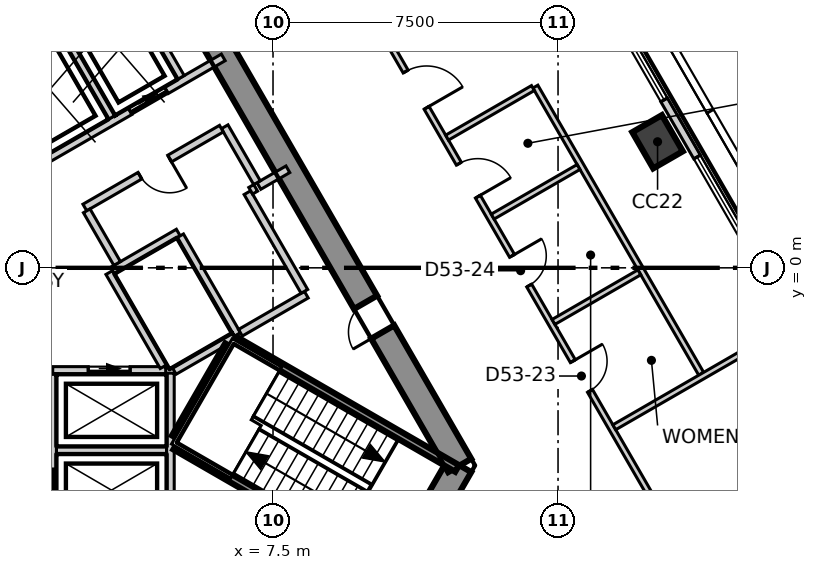
"""IFC4 building model, lengths in metres.
Left out: names, types, materials, properties, quantities, classifications, styles, units other than length and angle.
Written with IfcOpenShell. Run it as: python <this file> out.ifc"""

import sys

from ifc_helpers import new_model, si_unit, direction, frame, frame_2d, origin, origin_2d, place, context, subcontext, project, spatial, polyline, rectangle, outline, extrude, element, fill, save


model = new_model("IFC4")
c1 = context("Model", 3, precision=1e-05, world=origin(), true_north=direction((0.0, 1.0)))
c2 = subcontext(c1, "Body", "Model", "MODEL_VIEW")
j1 = project(units=[si_unit("LENGTHUNIT", "METRE"), si_unit("PLANEANGLEUNIT", "RADIAN")], contexts=[c1])
p1 = place(None, origin())
s1 = spatial("IfcSite", under=j1, at=p1, CompositionType="ELEMENT")
p2 = place(p1, origin())
s2 = spatial("IfcBuilding", under=s1, at=p2, CompositionType="ELEMENT")
p3 = place(p2, frame((0.0, 0.0, 227.3)))
s3 = spatial("IfcBuildingStorey", under=s2, at=p3, CompositionType="ELEMENT", Elevation=227.3)
p4 = place(p3, frame((10.71, -8.15, -0.3), z_axis=(0.0, 0.0, 1.0), x_axis=(0.49999337185, 0.866029230515, 0.0)))
e1 = element("IfcWall", 1, at=p4, inside=s3, PredefinedType="SHEAR", context=c2, shape_type="SweptSolid", body=[
    extrude(outline(polyline([(-0.202, -0.35), (1.703, -0.35), (3.608, -0.35), (3.204, 0.35), (1.703, 0.35), (0.202, 0.35), (-0.202, -0.35)])), origin(), (0.0, 0.0, 1.0), 4.0),
])
p5 = place(p4, frame((1.003, 0.0, 0.3)))
e2 = element("IfcOpeningElement", 2, at=p5, cuts=e1, PredefinedType="OPENING", context=c2, shape_type="SweptSolid", body=[
    extrude(rectangle(XDim=1.4, YDim=2.1, at=frame_2d((0.7, 1.05))), frame((0.0, 0.36, 0.0), z_axis=(0.0, -1.0, 0.0), x_axis=(1.0, 0.0, 0.0)), (0.0, 0.0, 1.0), 0.72),
])
p6 = place(p3, frame((12.413, -5.2, -0.3), z_axis=(0.0, 0.0, 1.0), x_axis=(-0.500011533395, 0.866018744874, 0.0)))
e3 = element("IfcWall", 3, at=p6, inside=s3, PredefinedType="SHEAR", context=c2, shape_type="SweptSolid", body=[
    extrude(outline(polyline([(-0.202, -0.35), (1.782, -0.35), (3.766, -0.35), (5.75, -0.35), (7.734, -0.35), (9.718, -0.35), (11.702, -0.35), (13.686, -0.35), (15.67, -0.35), (17.654, -0.35), (19.638, -0.35), (21.622, -0.35), (21.218, 0.35), (19.307, 0.35), (17.397, 0.35), (15.486, 0.35), (13.576, 0.35), (11.665, 0.35), (9.755, 0.35), (7.844, 0.35), (5.934, 0.35), (4.023, 0.35), (2.113, 0.35), (0.202, 0.35), (-0.202, -0.35)])), origin(), (0.0, 0.0, 1.0), 4.0),
])
p7 = place(p6, frame((4.055, 0.0, 0.3)))
e4 = element("IfcOpeningElement", 4, at=p7, cuts=e3, PredefinedType="OPENING", context=c2, shape_type="SweptSolid", body=[
    extrude(rectangle(XDim=0.9, YDim=2.1, at=frame_2d((0.45, 1.05))), frame((0.0, 0.36, 0.0), z_axis=(0.0, -1.0, 0.0), x_axis=(1.0, 0.0, 0.0)), (0.0, 0.0, 1.0), 0.72),
])
p8 = place(p6, frame((16.415, 0.0, 0.3)))
e5 = element("IfcOpeningElement", 5, at=p8, cuts=e3, PredefinedType="OPENING", context=c2, shape_type="SweptSolid", body=[
    extrude(rectangle(XDim=1.0, YDim=2.1, at=frame_2d((0.5, 1.05))), frame((0.0, 0.36, 0.0), z_axis=(0.0, -1.0, 0.0), x_axis=(1.0, 0.0, 0.0)), (0.0, 0.0, 1.0), 0.72),
])
p9 = place(p3, frame((17.619, 3.317, -0.3), z_axis=(0.0, 0.0, 1.0), x_axis=(-0.5, 0.866025403784, 0.0)))
e6 = element("IfcColumn", 6, at=p9, inside=s3, PredefinedType="COLUMN", context=c2, shape_type="SweptSolid", body=[
    extrude(rectangle(XDim=1.1, YDim=0.9, at=origin_2d()), origin(), (0.0, 0.0, 1.0), 4.0),
])
p10 = place(p3, frame((27.782, -12.884, 0.0), z_axis=(0.0, 0.0, 1.0), x_axis=(-0.500023345841, 0.866011924637, 0.0)))
e7 = element("IfcWall", 7, at=p10, inside=s3, PredefinedType="ELEMENTEDWALL", context=c2, shape_type="SweptSolid", body=[
    extrude(rectangle(XDim=50.078, YDim=0.2, at=frame_2d((25.039, 0.0))), origin(), (0.0, 0.0, 1.0), 3.7),
])
p11 = place(p10, frame((2.171, 0.0, 0.9)))
e8 = element("IfcOpeningElement", 8, at=p11, cuts=e7, PredefinedType="OPENING", context=c2, shape_type="SweptSolid", body=[
    extrude(rectangle(XDim=4.2, YDim=2.5, at=frame_2d((2.1, 1.25))), frame((0.0, 0.11, 0.0), z_axis=(0.0, -1.0, 0.0), x_axis=(1.0, 0.0, 0.0)), (0.0, 0.0, 1.0), 0.22),
])
p12 = place(p10, frame((8.108, 0.0, 0.9)))
e9 = element("IfcOpeningElement", 9, at=p12, cuts=e7, PredefinedType="OPENING", context=c2, shape_type="SweptSolid", body=[
    extrude(rectangle(XDim=4.2, YDim=2.5, at=frame_2d((2.1, 1.25))), frame((0.0, 0.11, 0.0), z_axis=(0.0, -1.0, 0.0), x_axis=(1.0, 0.0, 0.0)), (0.0, 0.0, 1.0), 0.22),
])
p13 = place(p10, frame((14.044, 0.0, 0.9)))
e10 = element("IfcOpeningElement", 10, at=p13, cuts=e7, PredefinedType="OPENING", context=c2, shape_type="SweptSolid", body=[
    extrude(rectangle(XDim=4.2, YDim=2.5, at=frame_2d((2.1, 1.25))), frame((0.0, 0.11, 0.0), z_axis=(0.0, -1.0, 0.0), x_axis=(1.0, 0.0, 0.0)), (0.0, 0.0, 1.0), 0.22),
])
p14 = place(p10, frame((19.981, 0.0, 0.9)))
e11 = element("IfcOpeningElement", 11, at=p14, cuts=e7, PredefinedType="OPENING", context=c2, shape_type="SweptSolid", body=[
    extrude(rectangle(XDim=4.2, YDim=2.5, at=frame_2d((2.1, 1.25))), frame((0.0, 0.11, 0.0), z_axis=(0.0, -1.0, 0.0), x_axis=(1.0, 0.0, 0.0)), (0.0, 0.0, 1.0), 0.22),
])
p15 = place(p10, frame((25.917, 0.0, 0.9)))
e12 = element("IfcOpeningElement", 12, at=p15, cuts=e7, PredefinedType="OPENING", context=c2, shape_type="SweptSolid", body=[
    extrude(rectangle(XDim=4.2, YDim=2.5, at=frame_2d((2.1, 1.25))), frame((0.0, 0.11, 0.0), z_axis=(0.0, -1.0, 0.0), x_axis=(1.0, 0.0, 0.0)), (0.0, 0.0, 1.0), 0.22),
])
p16 = place(p10, frame((31.854, 0.0, 0.9)))
e13 = element("IfcOpeningElement", 13, at=p16, cuts=e7, PredefinedType="OPENING", context=c2, shape_type="SweptSolid", body=[
    extrude(rectangle(XDim=4.2, YDim=2.5, at=frame_2d((2.1, 1.25))), frame((0.0, 0.11, 0.0), z_axis=(0.0, -1.0, 0.0), x_axis=(1.0, 0.0, 0.0)), (0.0, 0.0, 1.0), 0.22),
])
p17 = place(p10, frame((37.79, 0.0, 0.9)))
e14 = element("IfcOpeningElement", 14, at=p17, cuts=e7, PredefinedType="OPENING", context=c2, shape_type="SweptSolid", body=[
    extrude(rectangle(XDim=4.2, YDim=2.5, at=frame_2d((2.1, 1.25))), frame((0.0, 0.11, 0.0), z_axis=(0.0, -1.0, 0.0), x_axis=(1.0, 0.0, 0.0)), (0.0, 0.0, 1.0), 0.22),
])
p18 = place(p10, frame((43.727, 0.0, 0.9)))
e15 = element("IfcOpeningElement", 15, at=p18, cuts=e7, PredefinedType="OPENING", context=c2, shape_type="SweptSolid", body=[
    extrude(rectangle(XDim=4.2, YDim=2.5, at=frame_2d((2.1, 1.25))), frame((0.0, 0.11, 0.0), z_axis=(0.0, -1.0, 0.0), x_axis=(1.0, 0.0, 0.0)), (0.0, 0.0, 1.0), 0.22),
])
p19 = place(p3, frame((0.075, 24.07, 0.0), z_axis=(0.0, 0.0, 1.0), x_axis=(0.49999939571, -0.866025752671, 0.0)))
e16 = element("IfcWall", 16, at=p19, inside=s3, PredefinedType="PARTITIONING", context=c2, shape_type="SweptSolid", body=[
    extrude(rectangle(XDim=41.614, YDim=0.15, at=frame_2d((20.807, 0.0))), origin(), (0.0, 0.0, 1.0), 3.7),
])
p20 = place(p19, frame((36.714, 0.0, 0.0)))
e17 = element("IfcOpeningElement", 17, at=p20, cuts=e16, PredefinedType="OPENING", context=c2, shape_type="SweptSolid", body=[
    extrude(rectangle(XDim=1.1, YDim=2.1, at=frame_2d((0.55, 1.05))), frame((0.0, 0.085, 0.0), z_axis=(0.0, -1.0, 0.0), x_axis=(1.0, 0.0, 0.0)), (0.0, 0.0, 1.0), 0.17),
])
p21 = place(p19, frame((21.831, 0.0, 0.0)))
e18 = element("IfcOpeningElement", 18, at=p21, cuts=e16, PredefinedType="OPENING", context=c2, shape_type="SweptSolid", body=[
    extrude(rectangle(XDim=1.1, YDim=2.1, at=frame_2d((0.55, 1.05))), frame((0.0, 0.085, 0.0), z_axis=(0.0, -1.0, 0.0), x_axis=(1.0, 0.0, 0.0)), (0.0, 0.0, 1.0), 0.17),
])
p22 = place(p19, frame((30.631, 0.0, 0.0)))
e19 = element("IfcOpeningElement", 19, at=p22, cuts=e16, PredefinedType="OPENING", context=c2, shape_type="SweptSolid", body=[
    extrude(rectangle(XDim=0.9, YDim=2.1, at=frame_2d((0.45, 1.05))), frame((0.0, 0.085, 0.0), z_axis=(0.0, -1.0, 0.0), x_axis=(1.0, 0.0, 0.0)), (0.0, 0.0, 1.0), 0.17),
])
p23 = place(p19, frame((27.431, 0.0, 0.0)))
e20 = element("IfcOpeningElement", 20, at=p23, cuts=e16, PredefinedType="OPENING", context=c2, shape_type="SweptSolid", body=[
    extrude(rectangle(XDim=0.9, YDim=2.1, at=frame_2d((0.45, 1.05))), frame((0.0, 0.085, 0.0), z_axis=(0.0, -1.0, 0.0), x_axis=(1.0, 0.0, 0.0)), (0.0, 0.0, 1.0), 0.17),
])
p24 = place(p19, frame((24.631, 0.0, 0.0)))
e21 = element("IfcOpeningElement", 21, at=p24, cuts=e16, PredefinedType="OPENING", context=c2, shape_type="SweptSolid", body=[
    extrude(rectangle(XDim=1.0, YDim=2.1, at=frame_2d((0.5, 1.05))), frame((0.0, 0.085, 0.0), z_axis=(0.0, -1.0, 0.0), x_axis=(1.0, 0.0, 0.0)), (0.0, 0.0, 1.0), 0.17),
])
p25 = place(p19, frame((14.358, 0.0, 0.0)))
e22 = element("IfcOpeningElement", 22, at=p25, cuts=e16, PredefinedType="OPENING", context=c2, shape_type="SweptSolid", body=[
    extrude(rectangle(XDim=1.1, YDim=2.1, at=frame_2d((0.55, 1.05))), frame((0.0, 0.085, 0.0), z_axis=(0.0, -1.0, 0.0), x_axis=(1.0, 0.0, 0.0)), (0.0, 0.0, 1.0), 0.17),
])
p26 = place(p19, frame((3.885, 0.0, 0.0)))
e23 = element("IfcOpeningElement", 23, at=p26, cuts=e16, PredefinedType="OPENING", context=c2, shape_type="SweptSolid", body=[
    extrude(rectangle(XDim=1.1, YDim=2.1, at=frame_2d((0.55, 1.05))), frame((0.0, 0.085, 0.0), z_axis=(0.0, -1.0, 0.0), x_axis=(1.0, 0.0, 0.0)), (0.0, 0.0, 1.0), 0.17),
])
p27 = place(p3, frame((14.404, 4.768, 0.0), z_axis=(0.0, 0.0, 1.0), x_axis=(0.500042162787, -0.86600105972, 0.0)))
e24 = element("IfcWall", 24, at=p27, inside=s3, PredefinedType="PARTITIONING", context=c2, shape_type="SweptSolid", body=[
    extrude(rectangle(XDim=8.725, YDim=0.15, at=frame_2d((4.363, 0.0))), origin(), (0.0, 0.0, 1.0), 3.7),
])
for number, where, z_axis, x_axis in (
    (25, (12.08, 3.426, 0.0), (0.0, 0.0, 1.0), (0.866, 0.5, 0.0)),
    (26, (13.28, 1.348, 0.0), (0.0, 0.0, 1.0), (0.866, 0.5, 0.0)),
):
    element("IfcWall", number, at=place(p3, frame(where, z_axis=z_axis, x_axis=x_axis)), inside=s3, PredefinedType="PARTITIONING", context=c2, shape_type="SweptSolid", body=[
        extrude(rectangle(XDim=2.608, YDim=0.15, at=frame_2d((1.304, 0.0))), origin(), (0.0, 0.0, 1.0), 3.7),
    ])
p28 = place(p3, frame((14.88, -1.424, 0.0), z_axis=(0.0, 0.0, 1.0), x_axis=(0.865872279416, 0.500265125447, 0.0)))
e27 = element("IfcWall", 27, at=p28, inside=s3, PredefinedType="PARTITIONING", context=c2, shape_type="SweptSolid", body=[
    extrude(rectangle(XDim=2.609, YDim=0.15, at=frame_2d((1.304, 0.0))), origin(), (0.0, 0.0, 1.0), 3.7),
])
p29 = place(p3, frame((16.48, -4.195, 0.0), z_axis=(0.0, 0.0, 1.0), x_axis=(0.866032438121, 0.499987815973, 0.0)))
e28 = element("IfcWall", 28, at=p29, inside=s3, PredefinedType="PARTITIONING", context=c2, shape_type="SweptSolid", body=[
    extrude(rectangle(XDim=5.363, YDim=0.15, at=frame_2d((2.681, 0.0))), origin(), (0.0, 0.0, 1.0), 3.7),
])
p30 = place(p3, frame((1.8, -4.8, 0.0), z_axis=(0.0, 0.0, 1.0), x_axis=(1.0, 0.0, 0.0)))
e29 = element("IfcWall", 29, at=p30, inside=s3, PredefinedType="SOLIDWALL", context=c2, shape_type="SweptSolid", body=[
    extrude(rectangle(XDim=2.9, YDim=0.2, at=frame_2d((1.45, 0.0))), origin(), (0.0, 0.0, 1.0), 3.7),
])
p31 = place(p3, frame((1.703, -2.7, 0.0), z_axis=(0.0, 0.0, 1.0), x_axis=(1.0, 0.0, 0.0)))
e30 = element("IfcWall", 30, at=p31, inside=s3, PredefinedType="SOLIDWALL", context=c2, shape_type="SweptSolid", body=[
    extrude(rectangle(XDim=2.973, YDim=0.2, at=frame_2d((1.487, 0.0))), origin(), (0.0, 0.0, 1.0), 3.7),
])
p32 = place(p31, frame((0.936, 0.0, 0.0)))
e31 = element("IfcOpeningElement", 31, at=p32, cuts=e30, PredefinedType="OPENING", context=c2, shape_type="SweptSolid", body=[
    extrude(rectangle(XDim=1.1, YDim=2.1, at=frame_2d((0.55, 1.05))), frame((0.0, 0.11, 0.0), z_axis=(0.0, -1.0, 0.0), x_axis=(1.0, 0.0, 0.0)), (0.0, 0.0, 1.0), 0.22),
])
p33 = place(p3, frame((-0.002, 5.541, 0.0), z_axis=(0.0, 0.0, 1.0), x_axis=(0.86600155993, 0.500041296494, 0.0)))
e32 = element("IfcWall", 32, at=p33, inside=s3, PredefinedType="SOLIDWALL", context=c2, shape_type="SweptSolid", body=[
    extrude(rectangle(XDim=4.132, YDim=0.2, at=frame_2d((2.066, 0.0))), origin(), (0.0, 0.0, 1.0), 3.7),
])
p34 = place(p3, frame((3.19, -0.125, 0.0), z_axis=(0.0, 0.0, 1.0), x_axis=(0.499988658015, -0.866031951983, 0.0)))
e33 = element("IfcWall", 33, at=p34, inside=s3, PredefinedType="SOLIDWALL", context=c2, shape_type="SweptSolid", body=[
    extrude(rectangle(XDim=2.858, YDim=0.2, at=frame_2d((1.429, 0.0))), origin(), (0.0, 0.0, 1.0), 3.7),
])
p35 = place(p3, frame((1.578, 2.874, 0.0), z_axis=(0.0, 0.0, 1.0), x_axis=(0.866045911672, 0.499964477614, 0.0)))
e34 = element("IfcWall", 34, at=p35, inside=s3, PredefinedType="SOLIDWALL", context=c2, shape_type="SweptSolid", body=[
    extrude(rectangle(XDim=5.327, YDim=0.2, at=frame_2d((2.663, 0.0))), origin(), (0.0, 0.0, 1.0), 3.7),
])
p36 = place(p35, frame((2.496, 0.0, 0.0)))
e35 = element("IfcOpeningElement", 35, at=p36, cuts=e34, PredefinedType="OPENING", context=c2, shape_type="SweptSolid", body=[
    extrude(rectangle(XDim=1.1, YDim=2.1, at=frame_2d((0.55, 1.05))), frame((0.0, 0.11, 0.0), z_axis=(0.0, -1.0, 0.0), x_axis=(1.0, 0.0, 0.0)), (0.0, 0.0, 1.0), 0.22),
])
p37 = place(p3, frame((1.7, -8.13, 0.0), z_axis=(0.0, 0.0, 1.0), x_axis=(0.0, 1.0, 0.0)))
e36 = element("IfcWall", 36, at=p37, inside=s3, PredefinedType="SOLIDWALL", context=c2, shape_type="SweptSolid", body=[
    extrude(rectangle(XDim=5.327, YDim=0.2, at=frame_2d((2.664, 0.0))), origin(), (0.0, 0.0, 1.0), 3.7),
])
p38 = place(p37, frame((1.73, 0.0, 0.0)))
e37 = element("IfcOpeningElement", 37, at=p38, cuts=e36, PredefinedType="OPENING", context=c2, shape_type="SweptSolid", body=[
    extrude(rectangle(XDim=1.1, YDim=2.1, at=frame_2d((0.55, 1.05))), frame((0.0, 0.11, 0.0), z_axis=(0.0, -1.0, 0.0), x_axis=(1.0, 0.0, 0.0)), (0.0, 0.0, 1.0), 0.22),
])
p39 = place(p3, frame((4.8, -6.8, 0.0), z_axis=(0.0, 0.0, 1.0), x_axis=(0.0, 1.0, 0.0)))
e38 = element("IfcWall", 38, at=p39, inside=s3, PredefinedType="SOLIDWALL", context=c2, shape_type="SweptSolid", body=[
    extrude(rectangle(XDim=4.029, YDim=0.2, at=frame_2d((2.015, 0.0))), origin(), (0.0, 0.0, 1.0), 3.7),
])
p40 = place(p3, frame((3.278, -0.071, 0.0), z_axis=(0.0, 0.0, 1.0), x_axis=(0.865855657918, 0.500293893279, 0.0)))
e39 = element("IfcWall", 39, at=p40, inside=s3, PredefinedType="SOLIDWALL", context=c2, shape_type="SweptSolid", body=[
    extrude(rectangle(XDim=1.997, YDim=0.2, at=frame_2d((0.999, 0.0))), origin(), (0.0, 0.0, 1.0), 3.7),
])
p41 = place(p3, frame((7.129, 2.153, 0.0), z_axis=(0.0, 0.0, 1.0), x_axis=(0.866083962871, 0.499898558967, 0.0)))
e40 = element("IfcWall", 40, at=p41, inside=s3, PredefinedType="SOLIDWALL", context=c2, shape_type="SweptSolid", body=[
    extrude(rectangle(XDim=0.88, YDim=0.2, at=frame_2d((0.44, 0.0))), origin(), (0.0, 0.0, 1.0), 3.7),
])
for number, where, z_axis, x_axis in (
    (41, (3.626, 7.52, 0.0), (0.0, 0.0, 1.0), (0.5, -0.866, 0.0)),
    (42, (1.807, 6.47, 0.0), (0.0, 0.0, 1.0), (0.5, -0.866, 0.0)),
):
    element("IfcWall", number, at=place(p3, frame(where, z_axis=z_axis, x_axis=x_axis)), inside=s3, PredefinedType="SOLIDWALL", context=c2, shape_type="SweptSolid", body=[
        extrude(rectangle(XDim=2.9, YDim=0.2, at=frame_2d((1.45, 0.0))), origin(), (0.0, 0.0, 1.0), 3.7),
    ])
p42 = place(p3, frame((5.057, 0.841, 0.0), z_axis=(0.0, 0.0, 1.0), x_axis=(0.499990139034, -0.866031096941, 0.0)))
e43 = element("IfcWall", 43, at=p42, inside=s3, PredefinedType="SOLIDWALL", context=c2, shape_type="SweptSolid", body=[
    extrude(rectangle(XDim=3.0, YDim=0.2, at=frame_2d((1.5, 0.0))), origin(), (0.0, 0.0, 1.0), 3.7),
])
p43 = place(p3, frame((4.9, -2.714, 0.0), z_axis=(0.0, 0.0, 1.0), x_axis=(0.865846928409, 0.500309001083, 0.0)))
e44 = element("IfcWall", 44, at=p43, inside=s3, PredefinedType="SOLIDWALL", context=c2, shape_type="SweptSolid", body=[
    extrude(rectangle(XDim=1.813, YDim=0.2, at=frame_2d((0.907, 0.0))), origin(), (0.0, 0.0, 1.0), 3.7),
])
p44 = place(p3, frame((6.229, 3.712, 0.0), z_axis=(0.0, 0.0, 1.0), x_axis=(0.499875724984, -0.86609714211, 0.0)))
e45 = element("IfcWall", 45, at=p44, inside=s3, PredefinedType="SOLIDWALL", context=c2, shape_type="SweptSolid", body=[
    extrude(rectangle(XDim=1.701, YDim=0.2, at=frame_2d((0.85, 0.0))), origin(), (0.0, 0.0, 1.0), 3.7),
])
p45 = place(p3, frame((2.548, 1.587, 0.0), z_axis=(0.0, 0.0, 1.0), x_axis=(0.866004344652, 0.500036473714, 0.0)))
e46 = element("IfcWall", 46, at=p45, inside=s3, PredefinedType="SOLIDWALL", context=c2, shape_type="SweptSolid", body=[
    extrude(rectangle(XDim=4.15, YDim=0.2, at=frame_2d((2.075, 0.0))), origin(), (0.0, 0.0, 1.0), 3.7),
])
p46 = place(p45, frame((1.675, 0.0, 0.0)))
e47 = element("IfcOpeningElement", 47, at=p46, cuts=e46, PredefinedType="OPENING", context=c2, shape_type="SweptSolid", body=[
    extrude(rectangle(XDim=0.9, YDim=2.1, at=frame_2d((0.45, 1.05))), frame((0.0, 0.11, 0.0), z_axis=(0.0, -1.0, 0.0), x_axis=(1.0, 0.0, 0.0)), (0.0, 0.0, 1.0), 0.22),
])
p47 = place(p3, frame((2.598, 1.5, 0.0), z_axis=(0.0, 0.0, 1.0), x_axis=(0.499929347863, -0.866066190972, 0.0)))
e48 = element("IfcWall", 48, at=p47, inside=s3, PredefinedType="SOLIDWALL", context=c2, shape_type="SweptSolid", body=[
    extrude(rectangle(XDim=1.6, YDim=0.2, at=frame_2d((0.8, 0.0))), origin(), (0.0, 0.0, 1.0), 3.7),
])
p48 = place(p3, frame((6.642, -1.708, 0.0), z_axis=(0.0, 0.0, 1.0), x_axis=(0.866043441391, 0.499968756647, 0.0)))
e49 = element("IfcWall", 49, at=p48, inside=s3, PredefinedType="SOLIDWALL", context=c2, shape_type="SweptSolid", body=[
    extrude(rectangle(XDim=2.002, YDim=0.2, at=frame_2d((1.001, 0.0))), origin(), (0.0, 0.0, 1.0), 3.7),
])
p49 = place(p3, frame((6.826, 1.978, 0.0), z_axis=(0.0, 0.0, 1.0), x_axis=(0.499990139034, -0.866031096941, 0.0)))
e50 = element("IfcWall", 50, at=p49, inside=s3, PredefinedType="SOLIDWALL", context=c2, shape_type="SweptSolid", body=[
    extrude(rectangle(XDim=3.0, YDim=0.2, at=frame_2d((1.5, 0.0))), origin(), (0.0, 0.0, 1.0), 3.7),
])
p50 = place(p3, frame((6.912, 2.028, 0.0), z_axis=(0.0, 0.0, 1.0), x_axis=(0.866559367082, 0.499074005857, 0.0)))
e51 = element("IfcWall", 51, at=p50, inside=s3, PredefinedType="SOLIDWALL", context=c2, shape_type="SweptSolid", body=[
    extrude(rectangle(XDim=0.152, YDim=0.2, at=frame_2d((0.076, 0.0))), origin(), (0.0, 0.0, 1.0), 3.7),
])
p51 = place(p3, frame((4.929, -4.693, 0.0), z_axis=(0.0, 0.0, 1.0), x_axis=(0.865983344943, -0.500072840975, 0.0)))
e52 = element("IfcWall", 52, at=p51, inside=s3, PredefinedType="SOLIDWALL", context=c2, shape_type="SweptSolid", body=[
    extrude(rectangle(XDim=6.715, YDim=0.2, at=frame_2d((3.357, 0.0))), origin(), (0.0, 0.0, 1.0), 3.7),
])
p52 = place(p3, frame((4.929, -4.462, 0.0), z_axis=(0.0, 0.0, 1.0), x_axis=(0.500200581029, 0.865909567298, 0.0)))
e53 = element("IfcWall", 53, at=p52, inside=s3, PredefinedType="SOLIDWALL", context=c2, shape_type="SweptSolid", body=[
    extrude(rectangle(XDim=2.799, YDim=0.2, at=frame_2d((1.399, 0.0))), origin(), (0.0, 0.0, 1.0), 3.7),
])
p53 = place(p3, frame((6.529, -1.922, 0.0), z_axis=(0.0, 0.0, 1.0), x_axis=(0.866046323291, -0.499963764601, 0.0)))
e54 = element("IfcWall", 54, at=p53, inside=s3, PredefinedType="SOLIDWALL", context=c2, shape_type="SweptSolid", body=[
    extrude(rectangle(XDim=6.714, YDim=0.2, at=frame_2d((3.357, 0.0))), origin(), (0.0, 0.0, 1.0), 3.7),
])
p54 = place(p13, origin())
e55 = element("IfcWindow", 55, at=p54, inside=s3, PartitioningType="SINGLE_PANEL", PredefinedType="WINDOW", context=c2, shape_type="SweptSolid", body=[
    extrude(rectangle(XDim=4.2, YDim=2.5, at=frame_2d((2.1, 1.25))), frame((0.0, 0.03, 0.0), z_axis=(0.0, -1.0, 0.0), x_axis=(1.0, 0.0, 0.0)), (0.0, 0.0, 1.0), 0.06),
])
fill(e10, e55)
p55 = place(p14, origin())
e56 = element("IfcWindow", 56, at=p55, inside=s3, PartitioningType="SINGLE_PANEL", PredefinedType="WINDOW", context=c2, shape_type="SweptSolid", body=[
    extrude(rectangle(XDim=4.2, YDim=2.5, at=frame_2d((2.1, 1.25))), frame((0.0, 0.03, 0.0), z_axis=(0.0, -1.0, 0.0), x_axis=(1.0, 0.0, 0.0)), (0.0, 0.0, 1.0), 0.06),
])
fill(e11, e56)
p56 = place(p32, origin())
e57 = element("IfcDoor", 57, at=p56, inside=s3, OperationType="SLIDING_TO_LEFT", PredefinedType="DOOR", context=c2, shape_type="SweptSolid", body=[
    extrude(rectangle(XDim=1.1, YDim=2.1, at=frame_2d((0.55, 1.05))), frame((0.0, 0.025, 0.0), z_axis=(0.0, -1.0, 0.0), x_axis=(1.0, 0.0, 0.0)), (0.0, 0.0, 1.0), 0.05),
])
fill(e31, e57)
p57 = place(p38, origin())
e58 = element("IfcDoor", 58, at=p57, inside=s3, OperationType="SLIDING_TO_LEFT", PredefinedType="DOOR", context=c2, shape_type="SweptSolid", body=[
    extrude(rectangle(XDim=1.1, YDim=2.1, at=frame_2d((0.55, 1.05))), frame((0.0, 0.025, 0.0), z_axis=(0.0, -1.0, 0.0), x_axis=(1.0, 0.0, 0.0)), (0.0, 0.0, 1.0), 0.05),
])
fill(e37, e58)
p58 = place(p36, origin())
e59 = element("IfcDoor", 59, at=p58, inside=s3, OperationType="SLIDING_TO_LEFT", PredefinedType="DOOR", context=c2, shape_type="SweptSolid", body=[
    extrude(rectangle(XDim=1.1, YDim=2.1, at=frame_2d((0.55, 1.05))), frame((0.0, 0.025, 0.0), z_axis=(0.0, -1.0, 0.0), x_axis=(1.0, 0.0, 0.0)), (0.0, 0.0, 1.0), 0.05),
])
fill(e35, e59)
p59 = place(p21, origin())
e60 = element("IfcDoor", 60, at=p59, inside=s3, OperationType="SINGLE_SWING_LEFT", PredefinedType="DOOR", context=c2, shape_type="SweptSolid", body=[
    extrude(rectangle(XDim=1.1, YDim=2.1, at=frame_2d((0.55, 1.05))), frame((0.0, 0.025, 0.0), z_axis=(0.0, -1.0, 0.0), x_axis=(1.0, 0.0, 0.0)), (0.0, 0.0, 1.0), 0.05),
])
fill(e18, e60)
p60 = place(p22, origin())
e61 = element("IfcDoor", 61, at=p60, inside=s3, OperationType="SINGLE_SWING_RIGHT", PredefinedType="DOOR", context=c2, shape_type="SweptSolid", body=[
    extrude(rectangle(XDim=0.9, YDim=2.1, at=frame_2d((0.45, 1.05))), frame((0.0, 0.025, 0.0), z_axis=(0.0, -1.0, 0.0), x_axis=(1.0, 0.0, 0.0)), (0.0, 0.0, 1.0), 0.05),
])
fill(e19, e61)
p61 = place(p23, origin())
e62 = element("IfcDoor", 62, at=p61, inside=s3, OperationType="SINGLE_SWING_RIGHT", PredefinedType="DOOR", context=c2, shape_type="SweptSolid", body=[
    extrude(rectangle(XDim=0.9, YDim=2.1, at=frame_2d((0.45, 1.05))), frame((0.0, 0.025, 0.0), z_axis=(0.0, -1.0, 0.0), x_axis=(1.0, 0.0, 0.0)), (0.0, 0.0, 1.0), 0.05),
])
fill(e20, e62)
p62 = place(p24, origin())
e63 = element("IfcDoor", 63, at=p62, inside=s3, OperationType="SINGLE_SWING_LEFT", PredefinedType="DOOR", context=c2, shape_type="SweptSolid", body=[
    extrude(rectangle(XDim=1.0, YDim=2.1, at=frame_2d((0.5, 1.05))), frame((0.0, 0.025, 0.0), z_axis=(0.0, -1.0, 0.0), x_axis=(1.0, 0.0, 0.0)), (0.0, 0.0, 1.0), 0.05),
])
fill(e21, e63)
p63 = place(p7, origin())
e64 = element("IfcDoor", 64, at=p63, inside=s3, OperationType="SINGLE_SWING_RIGHT", PredefinedType="DOOR", context=c2, shape_type="SweptSolid", body=[
    extrude(rectangle(XDim=0.9, YDim=2.1, at=frame_2d((0.45, 1.05))), frame((0.0, 0.025, 0.0), z_axis=(0.0, -1.0, 0.0), x_axis=(1.0, 0.0, 0.0)), (0.0, 0.0, 1.0), 0.05),
])
fill(e4, e64)
p64 = place(p46, origin())
e65 = element("IfcDoor", 65, at=p64, inside=s3, OperationType="SINGLE_SWING_RIGHT", PredefinedType="DOOR", context=c2, shape_type="SweptSolid", body=[
    extrude(rectangle(XDim=0.9, YDim=2.1, at=frame_2d((0.45, 1.05))), frame((0.0, 0.025, 0.0), z_axis=(0.0, -1.0, 0.0), x_axis=(1.0, 0.0, 0.0)), (0.0, 0.0, 1.0), 0.05),
])
fill(e47, e65)
save(model, sys.argv[1])
